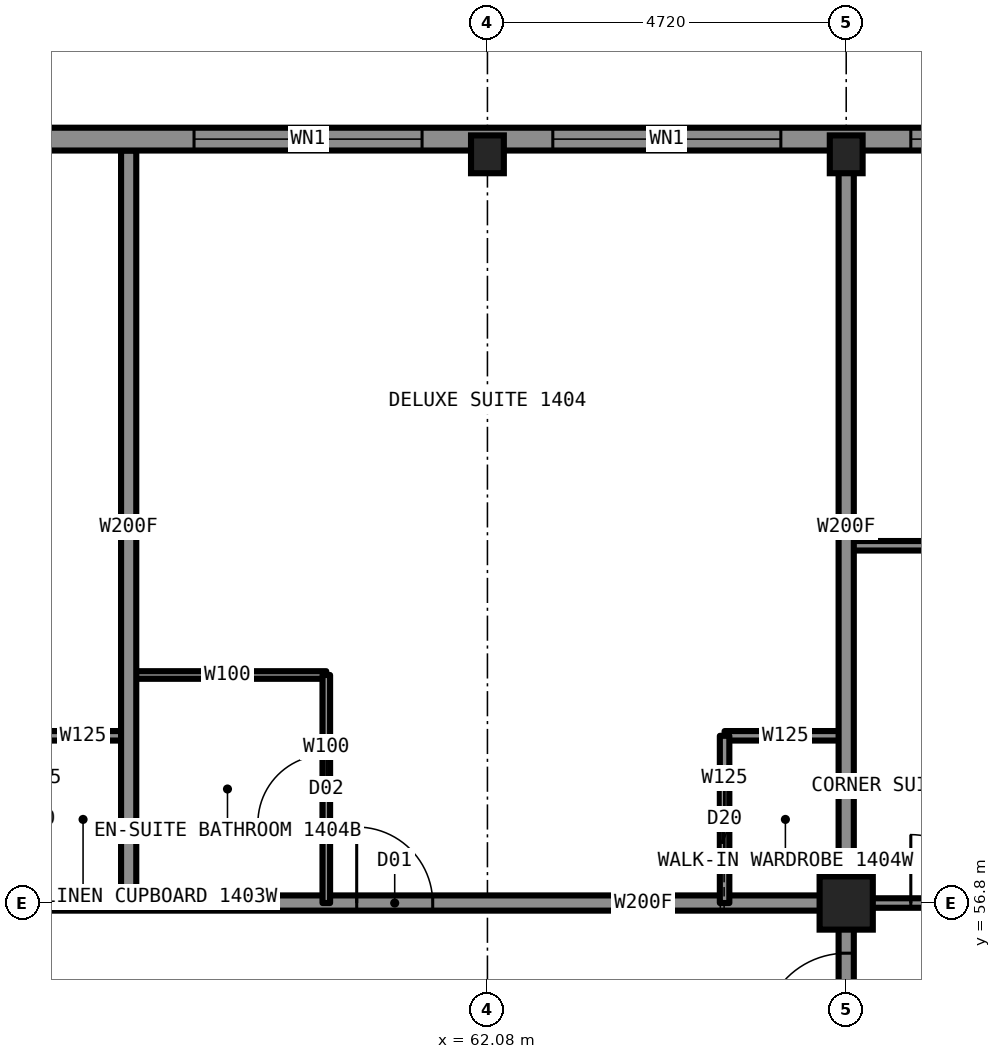
"""IFC4 building model, lengths in metres.
Left out: names, types, materials, properties, quantities, classifications, styles, units other than length and angle.
Written with IfcOpenShell. Run it as: python <this file> out.ifc"""

import sys

from ifc_helpers import new_model, si_unit, direction, frame, frame_2d, origin, origin_2d, place, context, subcontext, project, spatial, rectangle, hollow_rectangle, i_section, extrude, element, fill, save


model = new_model("IFC4")
c1 = context("Model", 3, precision=1e-05, world=origin(), true_north=direction((0.0, 1.0)))
c2 = subcontext(c1, "Body", "Model", "MODEL_VIEW")
j1 = project(units=[si_unit("LENGTHUNIT", "METRE"), si_unit("PLANEANGLEUNIT", "RADIAN")], contexts=[c1])
p1 = place(None, origin())
s1 = spatial("IfcSite", under=j1, at=p1, CompositionType="ELEMENT")
p2 = place(p1, origin())
s2 = spatial("IfcBuilding", under=s1, at=p2, CompositionType="ELEMENT")
p3 = place(p2, frame((0.0, 0.0, 49.5)))
s3 = spatial("IfcBuildingStorey", under=s2, at=p3, CompositionType="ELEMENT", Elevation=49.5)
for number, where, z_axis, x_axis in (
    (1, (62.08, 66.65, 0.0), (0.0, 0.0, 1.0), (1.0, 0.0, 0.0)),
    (2, (66.8, 66.65, 0.0), (0.0, 0.0, 1.0), (1.0, 0.0, 0.0)),
):
    element("IfcColumn", number, at=place(p3, frame(where, z_axis=z_axis, x_axis=x_axis)), inside=s3, PredefinedType="COLUMN", context=c2, shape_type="SweptSolid", body=[
        extrude(i_section(OverallWidth=0.432, OverallDepth=0.498, WebThickness=0.056, FlangeThickness=0.089, at=origin_2d()), origin(), (0.0, 0.0, 1.0), 3.5),
    ])
p4 = place(p3, frame((66.8, 56.8, 0.0), z_axis=(0.0, 0.0, 1.0), x_axis=(1.0, 0.0, 0.0)))
e3 = element("IfcColumn", 3, at=p4, inside=s3, PredefinedType="COLUMN", context=c2, shape_type="SweptSolid", body=[
    extrude(hollow_rectangle(XDim=0.7, YDim=0.7, WallThickness=0.06, at=origin_2d()), origin(), (0.0, 0.0, 1.0), 3.5),
])
p5 = place(p3, frame((43.2, 56.8, 0.0), z_axis=(0.0, 0.0, 1.0), x_axis=(1.0, 0.0, 0.0)))
e4 = element("IfcWall", 4, at=p5, inside=s3, PredefinedType="PARTITIONING", context=c2, shape_type="SweptSolid", body=[
    extrude(rectangle(XDim=23.6, YDim=0.2, at=frame_2d((11.8, 0.0))), origin(), (0.0, 0.0, 1.0), 3.33),
])
p6 = place(p5, frame((1.46, 0.0, 0.0)))
e5 = element("IfcOpeningElement", 5, at=p6, cuts=e4, PredefinedType="OPENING", context=c2, shape_type="SweptSolid", body=[
    extrude(rectangle(XDim=1.0, YDim=2.2, at=frame_2d((0.5, 1.1))), frame((0.0, 0.11, 0.0), z_axis=(0.0, -1.0, 0.0), x_axis=(1.0, 0.0, 0.0)), (0.0, 0.0, 1.0), 0.22),
])
p7 = place(p5, frame((7.27, 0.0, 0.0)))
e6 = element("IfcOpeningElement", 6, at=p7, cuts=e4, PredefinedType="OPENING", context=c2, shape_type="SweptSolid", body=[
    extrude(rectangle(XDim=1.0, YDim=2.2, at=frame_2d((0.5, 1.1))), frame((0.0, 0.11, 0.0), z_axis=(0.0, -1.0, 0.0), x_axis=(1.0, 0.0, 0.0)), (0.0, 0.0, 1.0), 0.22),
])
p8 = place(p5, frame((11.7, 0.0, 0.0)))
e7 = element("IfcOpeningElement", 7, at=p8, cuts=e4, PredefinedType="OPENING", context=c2, shape_type="SweptSolid", body=[
    extrude(rectangle(XDim=1.0, YDim=2.2, at=frame_2d((0.5, 1.1))), frame((0.0, 0.11, 0.0), z_axis=(0.0, -1.0, 0.0), x_axis=(1.0, 0.0, 0.0)), (0.0, 0.0, 1.0), 0.22),
])
p9 = place(p5, frame((17.16, 0.0, 0.0)))
e8 = element("IfcOpeningElement", 8, at=p9, cuts=e4, PredefinedType="OPENING", context=c2, shape_type="SweptSolid", body=[
    extrude(rectangle(XDim=1.0, YDim=2.2, at=frame_2d((0.5, 1.1))), frame((0.0, 0.11, 0.0), z_axis=(0.0, -1.0, 0.0), x_axis=(1.0, 0.0, 0.0)), (0.0, 0.0, 1.0), 0.22),
])
p10 = place(p3, frame((66.8, 56.8, 0.0), z_axis=(0.0, 0.0, 1.0), x_axis=(1.0, 0.0, 0.0)))
e9 = element("IfcWall", 9, at=p10, inside=s3, PredefinedType="PARTITIONING", context=c2, shape_type="SweptSolid", body=[
    extrude(rectangle(XDim=9.9, YDim=0.125, at=frame_2d((4.95, 0.0))), origin(), (0.0, 0.0, 1.0), 2.573),
])
p11 = place(p10, frame((0.85, 0.0, 0.0)))
e10 = element("IfcOpeningElement", 10, at=p11, cuts=e9, PredefinedType="OPENING", context=c2, shape_type="SweptSolid", body=[
    extrude(rectangle(XDim=0.9, YDim=2.2, at=frame_2d((0.45, 1.1))), frame((0.0, 0.073, 0.0), z_axis=(0.0, -1.0, 0.0), x_axis=(1.0, 0.0, 0.0)), (0.0, 0.0, 1.0), 0.145),
])
p12 = place(p3, frame((56.16, 59.0, 0.0), z_axis=(0.0, 0.0, 1.0), x_axis=(1.0, 0.0, 0.0)))
e11 = element("IfcWall", 11, at=p12, inside=s3, PredefinedType="PARTITIONING", context=c2, shape_type="SweptSolid", body=[
    extrude(rectangle(XDim=1.2, YDim=0.125, at=frame_2d((0.6, 0.0))), origin(), (0.0, 0.0, 1.0), 3.33),
])
p13 = place(p3, frame((65.2, 59.0, 0.0), z_axis=(0.0, 0.0, 1.0), x_axis=(1.0, 0.0, 0.0)))
e12 = element("IfcWall", 12, at=p13, inside=s3, PredefinedType="PARTITIONING", context=c2, shape_type="SweptSolid", body=[
    extrude(rectangle(XDim=1.6, YDim=0.125, at=frame_2d((0.8, 0.0))), origin(), (0.0, 0.0, 1.0), 3.33),
])
p14 = place(p3, frame((57.36, 59.8, 0.0), z_axis=(0.0, 0.0, 1.0), x_axis=(1.0, 0.0, 0.0)))
e13 = element("IfcWall", 13, at=p14, inside=s3, PredefinedType="PARTITIONING", context=c2, shape_type="SweptSolid", body=[
    extrude(rectangle(XDim=2.6, YDim=0.1, at=frame_2d((1.3, 0.0))), origin(), (0.0, 0.0, 1.0), 3.33),
])
p15 = place(p3, frame((66.8, 61.5, 0.0), z_axis=(0.0, 0.0, 1.0), x_axis=(1.0, 0.0, 0.0)))
e14 = element("IfcWall", 14, at=p15, inside=s3, PredefinedType="PARTITIONING", context=c2, shape_type="SweptSolid", body=[
    extrude(rectangle(XDim=9.894, YDim=0.125, at=frame_2d((4.947, 0.0))), origin(), (0.0, 0.0, 1.0), 3.33),
])
p16 = place(p15, frame((1.75, 0.0, 0.0)))
e15 = element("IfcOpeningElement", 15, at=p16, cuts=e14, PredefinedType="OPENING", context=c2, shape_type="SweptSolid", body=[
    extrude(rectangle(XDim=0.9, YDim=2.2, at=frame_2d((0.45, 1.1))), frame((0.0, 0.073, 0.0), z_axis=(0.0, -1.0, 0.0), x_axis=(1.0, 0.0, 0.0)), (0.0, 0.0, 1.0), 0.145),
])
p17 = place(p3, frame((65.2, 56.8, 0.0), z_axis=(0.0, 0.0, 1.0), x_axis=(0.0, 1.0, 0.0)))
e16 = element("IfcWall", 16, at=p17, inside=s3, PredefinedType="PARTITIONING", context=c2, shape_type="SweptSolid", body=[
    extrude(rectangle(XDim=2.2, YDim=0.125, at=frame_2d((1.1, 0.0))), origin(), (0.0, 0.0, 1.0), 3.33),
])
p18 = place(p17, frame((0.7, 0.0, 0.0)))
e17 = element("IfcOpeningElement", 17, at=p18, cuts=e16, PredefinedType="OPENING", context=c2, shape_type="SweptSolid", body=[
    extrude(rectangle(XDim=0.8, YDim=2.1, at=frame_2d((0.4, 1.05))), frame((0.0, 0.073, 0.0), z_axis=(0.0, -1.0, 0.0), x_axis=(1.0, 0.0, 0.0)), (0.0, 0.0, 1.0), 0.145),
])
p19 = place(p3, frame((66.8, 52.08, 0.0), z_axis=(0.0, 0.0, 1.0), x_axis=(0.0, 1.0, 0.0)))
e18 = element("IfcWall", 18, at=p19, inside=s3, PredefinedType="PARTITIONING", context=c2, shape_type="SweptSolid", body=[
    extrude(rectangle(XDim=4.72, YDim=0.2, at=frame_2d((2.36, 0.0))), origin(), (0.0, 0.0, 1.0), 3.33),
])
p20 = place(p19, frame((2.96, 0.0, 0.0)))
e19 = element("IfcOpeningElement", 19, at=p20, cuts=e18, PredefinedType="OPENING", context=c2, shape_type="SweptSolid", body=[
    extrude(rectangle(XDim=1.1, YDim=2.2, at=frame_2d((0.55, 1.1))), frame((0.0, 0.11, 0.0), z_axis=(0.0, -1.0, 0.0), x_axis=(1.0, 0.0, 0.0)), (0.0, 0.0, 1.0), 0.22),
])
p21 = place(p3, frame((66.8, 56.8, 0.0), z_axis=(0.0, 0.0, 1.0), x_axis=(0.0, 1.0, 0.0)))
e20 = element("IfcWall", 20, at=p21, inside=s3, PredefinedType="PARTITIONING", context=c2, shape_type="SweptSolid", body=[
    extrude(rectangle(XDim=9.9, YDim=0.2, at=frame_2d((4.95, 0.0))), origin(), (0.0, 0.0, 1.0), 2.573),
])
p22 = place(p3, frame((57.36, 56.8, 0.0), z_axis=(0.0, 0.0, 1.0), x_axis=(0.0, 1.0, 0.0)))
e21 = element("IfcWall", 21, at=p22, inside=s3, PredefinedType="PARTITIONING", context=c2, shape_type="SweptSolid", body=[
    extrude(rectangle(XDim=9.9, YDim=0.2, at=frame_2d((4.95, 0.0))), origin(), (0.0, 0.0, 1.0), 3.33),
])
p23 = place(p3, frame((59.96, 56.8, 0.0), z_axis=(0.0, 0.0, 1.0), x_axis=(0.0, 1.0, 0.0)))
e22 = element("IfcWall", 22, at=p23, inside=s3, PredefinedType="PARTITIONING", context=c2, shape_type="SweptSolid", body=[
    extrude(rectangle(XDim=3.0, YDim=0.1, at=frame_2d((1.5, 0.0))), origin(), (0.0, 0.0, 1.0), 3.33),
])
p24 = place(p23, frame((1.05, 0.0, 0.0)))
e23 = element("IfcOpeningElement", 23, at=p24, cuts=e22, PredefinedType="OPENING", context=c2, shape_type="SweptSolid", body=[
    extrude(rectangle(XDim=0.9, YDim=2.1, at=frame_2d((0.45, 1.05))), frame((0.0, 0.06, 0.0), z_axis=(0.0, -1.0, 0.0), x_axis=(1.0, 0.0, 0.0)), (0.0, 0.0, 1.0), 0.12),
])
p25 = place(p3, frame((71.5, 66.85, 0.0), z_axis=(0.0, 0.0, 1.0), x_axis=(-1.0, 0.0, 0.0)))
e24 = element("IfcWall", 24, at=p25, inside=s3, PredefinedType="SOLIDWALL", context=c2, shape_type="SweptSolid", body=[
    extrude(rectangle(XDim=33.0, YDim=0.3, at=frame_2d((16.5, 0.0))), origin(), (0.0, 0.0, 1.0), 2.83),
])
p26 = place(p25, frame((0.85, 0.0, 0.5)))
e25 = element("IfcOpeningElement", 25, at=p26, cuts=e24, PredefinedType="OPENING", context=c2, shape_type="SweptSolid", body=[
    extrude(rectangle(XDim=3.0, YDim=2.0, at=frame_2d((1.5, 1.0))), frame((0.0, 0.16, 0.0), z_axis=(0.0, -1.0, 0.0), x_axis=(1.0, 0.0, 0.0)), (0.0, 0.0, 1.0), 0.32),
])
p27 = place(p25, frame((5.56, 0.0, 0.5)))
e26 = element("IfcOpeningElement", 26, at=p27, cuts=e24, PredefinedType="OPENING", context=c2, shape_type="SweptSolid", body=[
    extrude(rectangle(XDim=3.0, YDim=2.0, at=frame_2d((1.5, 1.0))), frame((0.0, 0.16, 0.0), z_axis=(0.0, -1.0, 0.0), x_axis=(1.0, 0.0, 0.0)), (0.0, 0.0, 1.0), 0.32),
])
p28 = place(p25, frame((10.28, 0.0, 1.1)))
e27 = element("IfcOpeningElement", 27, at=p28, cuts=e24, PredefinedType="OPENING", context=c2, shape_type="SweptSolid", body=[
    extrude(rectangle(XDim=1.1, YDim=1.4, at=frame_2d((0.55, 0.7))), frame((0.0, 0.16, 0.0), z_axis=(0.0, -1.0, 0.0), x_axis=(1.0, 0.0, 0.0)), (0.0, 0.0, 1.0), 0.32),
])
p29 = place(p25, frame((15.0, 0.0, 0.5)))
e28 = element("IfcOpeningElement", 28, at=p29, cuts=e24, PredefinedType="OPENING", context=c2, shape_type="SweptSolid", body=[
    extrude(rectangle(XDim=3.0, YDim=2.0, at=frame_2d((1.5, 1.0))), frame((0.0, 0.16, 0.0), z_axis=(0.0, -1.0, 0.0), x_axis=(1.0, 0.0, 0.0)), (0.0, 0.0, 1.0), 0.32),
])
p30 = place(p25, frame((21.62, 0.0, 1.1)))
e29 = element("IfcOpeningElement", 29, at=p30, cuts=e24, PredefinedType="OPENING", context=c2, shape_type="SweptSolid", body=[
    extrude(rectangle(XDim=1.1, YDim=1.4, at=frame_2d((0.55, 0.7))), frame((0.0, 0.16, 0.0), z_axis=(0.0, -1.0, 0.0), x_axis=(1.0, 0.0, 0.0)), (0.0, 0.0, 1.0), 0.32),
])
p31 = place(p25, frame((24.44, 0.0, 0.5)))
e30 = element("IfcOpeningElement", 30, at=p31, cuts=e24, PredefinedType="OPENING", context=c2, shape_type="SweptSolid", body=[
    extrude(rectangle(XDim=3.0, YDim=2.0, at=frame_2d((1.5, 1.0))), frame((0.0, 0.16, 0.0), z_axis=(0.0, -1.0, 0.0), x_axis=(1.0, 0.0, 0.0)), (0.0, 0.0, 1.0), 0.32),
])
p32 = place(p25, frame((29.15, 0.0, 0.5)))
e31 = element("IfcOpeningElement", 31, at=p32, cuts=e24, PredefinedType="OPENING", context=c2, shape_type="SweptSolid", body=[
    extrude(rectangle(XDim=3.0, YDim=2.0, at=frame_2d((1.5, 1.0))), frame((0.0, 0.16, 0.0), z_axis=(0.0, -1.0, 0.0), x_axis=(1.0, 0.0, 0.0)), (0.0, 0.0, 1.0), 0.32),
])
p33 = place(p9, origin())
e32 = element("IfcDoor", 32, at=p33, inside=s3, OperationType="SINGLE_SWING_LEFT", PredefinedType="DOOR", context=c2, shape_type="SweptSolid", body=[
    extrude(rectangle(XDim=1.0, YDim=2.2, at=frame_2d((0.5, 1.1))), frame((0.0, 0.025, 0.0), z_axis=(0.0, -1.0, 0.0), x_axis=(1.0, 0.0, 0.0)), (0.0, 0.0, 1.0), 0.05),
])
fill(e8, e32)
p34 = place(p24, origin())
e33 = element("IfcDoor", 33, at=p34, inside=s3, OperationType="SINGLE_SWING_RIGHT", PredefinedType="DOOR", context=c2, shape_type="SweptSolid", body=[
    extrude(rectangle(XDim=0.9, YDim=2.1, at=frame_2d((0.45, 1.05))), frame((0.0, 0.025, 0.0), z_axis=(0.0, -1.0, 0.0), x_axis=(1.0, 0.0, 0.0)), (0.0, 0.0, 1.0), 0.05),
])
fill(e23, e33)
p35 = place(p18, origin())
e34 = element("IfcDoor", 34, at=p35, inside=s3, OperationType="SLIDING_TO_LEFT", PredefinedType="DOOR", context=c2, shape_type="SweptSolid", body=[
    extrude(rectangle(XDim=0.8, YDim=2.1, at=frame_2d((0.4, 1.05))), frame((0.0, 0.025, 0.0), z_axis=(0.0, -1.0, 0.0), x_axis=(1.0, 0.0, 0.0)), (0.0, 0.0, 1.0), 0.05),
])
fill(e17, e34)
p36 = place(p11, origin())
e35 = element("IfcDoor", 35, at=p36, inside=s3, OperationType="SINGLE_SWING_LEFT", PredefinedType="DOOR", context=c2, shape_type="SweptSolid", body=[
    extrude(rectangle(XDim=0.9, YDim=2.2, at=frame_2d((0.45, 1.1))), frame((0.0, 0.025, 0.0), z_axis=(0.0, -1.0, 0.0), x_axis=(1.0, 0.0, 0.0)), (0.0, 0.0, 1.0), 0.05),
])
fill(e10, e35)
p37 = place(p20, origin())
e36 = element("IfcDoor", 36, at=p37, inside=s3, OperationType="SINGLE_SWING_LEFT", PredefinedType="DOOR", context=c2, shape_type="SweptSolid", body=[
    extrude(rectangle(XDim=1.1, YDim=2.2, at=frame_2d((0.55, 1.1))), frame((0.0, 0.025, 0.0), z_axis=(0.0, -1.0, 0.0), x_axis=(1.0, 0.0, 0.0)), (0.0, 0.0, 1.0), 0.05),
])
fill(e19, e36)
p38 = place(p26, origin())
e37 = element("IfcWindow", 37, at=p38, inside=s3, PartitioningType="SINGLE_PANEL", PredefinedType="WINDOW", context=c2, shape_type="SweptSolid", body=[
    extrude(rectangle(XDim=3.0, YDim=2.0, at=frame_2d((1.5, 1.0))), frame((0.0, 0.03, 0.0), z_axis=(0.0, -1.0, 0.0), x_axis=(1.0, 0.0, 0.0)), (0.0, 0.0, 1.0), 0.06),
])
fill(e25, e37)
p39 = place(p27, origin())
e38 = element("IfcWindow", 38, at=p39, inside=s3, PartitioningType="SINGLE_PANEL", PredefinedType="WINDOW", context=c2, shape_type="SweptSolid", body=[
    extrude(rectangle(XDim=3.0, YDim=2.0, at=frame_2d((1.5, 1.0))), frame((0.0, 0.03, 0.0), z_axis=(0.0, -1.0, 0.0), x_axis=(1.0, 0.0, 0.0)), (0.0, 0.0, 1.0), 0.06),
])
fill(e26, e38)
p40 = place(p28, origin())
e39 = element("IfcWindow", 39, at=p40, inside=s3, PartitioningType="SINGLE_PANEL", PredefinedType="WINDOW", context=c2, shape_type="SweptSolid", body=[
    extrude(rectangle(XDim=1.1, YDim=1.4, at=frame_2d((0.55, 0.7))), frame((0.0, 0.03, 0.0), z_axis=(0.0, -1.0, 0.0), x_axis=(1.0, 0.0, 0.0)), (0.0, 0.0, 1.0), 0.06),
])
fill(e27, e39)
p41 = place(p29, origin())
e40 = element("IfcWindow", 40, at=p41, inside=s3, PartitioningType="SINGLE_PANEL", PredefinedType="WINDOW", context=c2, shape_type="SweptSolid", body=[
    extrude(rectangle(XDim=3.0, YDim=2.0, at=frame_2d((1.5, 1.0))), frame((0.0, 0.03, 0.0), z_axis=(0.0, -1.0, 0.0), x_axis=(1.0, 0.0, 0.0)), (0.0, 0.0, 1.0), 0.06),
])
fill(e28, e40)
save(model, sys.argv[1])
